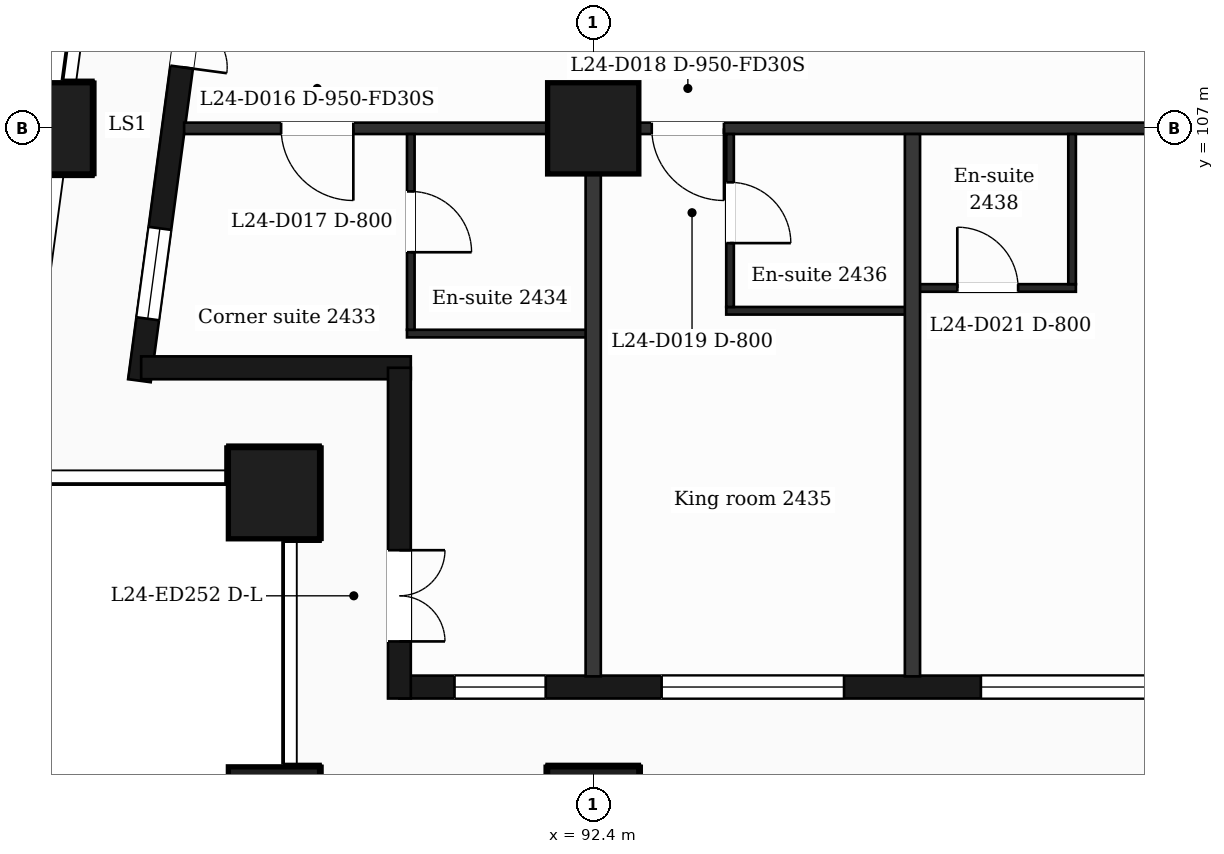
"""IFC4 building model, lengths in metres.
Left out: names, types, materials, properties, quantities, classifications, styles, units other than length and angle.
Written with IfcOpenShell. Run it as: python <this file> out.ifc"""

import sys

from ifc_helpers import new_model, si_unit, direction, frame, frame_2d, origin, origin_2d, place, context, subcontext, project, spatial, rectangle, extrude, element, fill, save


model = new_model("IFC4")
c1 = context("Model", 3, precision=1e-05, world=origin(), true_north=direction((0.0, 1.0)))
c2 = subcontext(c1, "Body", "Model", "MODEL_VIEW")
j1 = project(units=[si_unit("LENGTHUNIT", "METRE"), si_unit("PLANEANGLEUNIT", "RADIAN")], contexts=[c1])
p1 = place(None, origin())
s1 = spatial("IfcSite", under=j1, at=p1, CompositionType="ELEMENT")
p2 = place(p1, origin())
s2 = spatial("IfcBuilding", under=s1, at=p2, CompositionType="ELEMENT")
p3 = place(p2, frame((0.0, 0.0, 105.8)))
s3 = spatial("IfcBuildingStorey", under=s2, at=p3, CompositionType="ELEMENT", Elevation=105.8)
for number, where, z_axis, x_axis in (
    (1, (92.4, 98.0, 0.0), (0.0, 0.0, 1.0), (1.0, 0.0, 0.0)),
    (2, (88.2, 98.0, 0.0), (0.0, 0.0, 1.0), (1.0, 0.0, 0.0)),
    (3, (88.2, 102.2, 0.0), (0.0, 0.0, 1.0), (1.0, 0.0, 0.0)),
    (4, (92.4, 107.0, 0.0), (0.0, 0.0, 1.0), (1.0, 0.0, 0.0)),
    (5, (85.211, 107.0, 0.0), (0.0, 0.0, 1.0), (1.0, 0.0, 0.0)),
):
    element("IfcColumn", number, at=place(p3, frame(where, z_axis=z_axis, x_axis=x_axis)), inside=s3, PredefinedType="COLUMN", context=c2, shape_type="SweptSolid", body=[
        extrude(rectangle(XDim=1.2, YDim=1.2, at=origin_2d()), origin(), (0.0, 0.0, 1.0), 3.7),
    ])
p4 = place(p3, frame((89.85, 99.65, 0.0), z_axis=(0.0, 0.0, 1.0), x_axis=(1.0, 0.0, 0.0)))
e6 = element("IfcWall", 6, at=p4, inside=s3, PredefinedType="SOLIDWALL", context=c2, shape_type="SweptSolid", body=[
    extrude(rectangle(XDim=47.25, YDim=0.3, at=frame_2d((23.625, 0.0))), origin(), (0.0, 0.0, 1.0), 3.38),
])
p5 = place(p4, frame((0.725, 0.0, 0.9)))
e7 = element("IfcOpeningElement", 7, at=p5, cuts=e6, PredefinedType="OPENING", context=c2, shape_type="SweptSolid", body=[
    extrude(rectangle(XDim=1.2, YDim=2.1, at=frame_2d((0.6, 1.05))), frame((0.0, 0.16, 0.0), z_axis=(0.0, -1.0, 0.0), x_axis=(1.0, 0.0, 0.0)), (0.0, 0.0, 1.0), 0.32),
])
p6 = place(p4, frame((3.45, 0.0, 0.9)))
e8 = element("IfcOpeningElement", 8, at=p6, cuts=e6, PredefinedType="OPENING", context=c2, shape_type="SweptSolid", body=[
    extrude(rectangle(XDim=2.4, YDim=2.1, at=frame_2d((1.2, 1.05))), frame((0.0, 0.16, 0.0), z_axis=(0.0, -1.0, 0.0), x_axis=(1.0, 0.0, 0.0)), (0.0, 0.0, 1.0), 0.32),
])
p7 = place(p4, frame((7.65, 0.0, 0.9)))
e9 = element("IfcOpeningElement", 9, at=p7, cuts=e6, PredefinedType="OPENING", context=c2, shape_type="SweptSolid", body=[
    extrude(rectangle(XDim=2.4, YDim=2.1, at=frame_2d((1.2, 1.05))), frame((0.0, 0.16, 0.0), z_axis=(0.0, -1.0, 0.0), x_axis=(1.0, 0.0, 0.0)), (0.0, 0.0, 1.0), 0.32),
])
p8 = place(p4, frame((12.45, 0.0, 0.9)))
e10 = element("IfcOpeningElement", 10, at=p8, cuts=e6, PredefinedType="OPENING", context=c2, shape_type="SweptSolid", body=[
    extrude(rectangle(XDim=1.2, YDim=2.1, at=frame_2d((0.6, 1.05))), frame((0.0, 0.16, 0.0), z_axis=(0.0, -1.0, 0.0), x_axis=(1.0, 0.0, 0.0)), (0.0, 0.0, 1.0), 0.32),
])
p9 = place(p4, frame((16.65, 0.0, 0.9)))
e11 = element("IfcOpeningElement", 11, at=p9, cuts=e6, PredefinedType="OPENING", context=c2, shape_type="SweptSolid", body=[
    extrude(rectangle(XDim=1.2, YDim=2.1, at=frame_2d((0.6, 1.05))), frame((0.0, 0.16, 0.0), z_axis=(0.0, -1.0, 0.0), x_axis=(1.0, 0.0, 0.0)), (0.0, 0.0, 1.0), 0.32),
])
p10 = place(p4, frame((19.95, 0.0, 0.0)))
e12 = element("IfcOpeningElement", 12, at=p10, cuts=e6, PredefinedType="OPENING", context=c2, shape_type="SweptSolid", body=[
    extrude(rectangle(XDim=1.2, YDim=2.4, at=frame_2d((0.6, 1.2))), frame((0.0, 0.16, 0.0), z_axis=(0.0, -1.0, 0.0), x_axis=(1.0, 0.0, 0.0)), (0.0, 0.0, 1.0), 0.32),
])
p11 = place(p4, frame((21.75, 0.0, 0.9)))
e13 = element("IfcOpeningElement", 13, at=p11, cuts=e6, PredefinedType="OPENING", context=c2, shape_type="SweptSolid", body=[
    extrude(rectangle(XDim=1.2, YDim=2.1, at=frame_2d((0.6, 1.05))), frame((0.0, 0.16, 0.0), z_axis=(0.0, -1.0, 0.0), x_axis=(1.0, 0.0, 0.0)), (0.0, 0.0, 1.0), 0.32),
])
p12 = place(p4, frame((24.45, 0.0, 0.9)))
e14 = element("IfcOpeningElement", 14, at=p12, cuts=e6, PredefinedType="OPENING", context=c2, shape_type="SweptSolid", body=[
    extrude(rectangle(XDim=2.4, YDim=2.1, at=frame_2d((1.2, 1.05))), frame((0.0, 0.16, 0.0), z_axis=(0.0, -1.0, 0.0), x_axis=(1.0, 0.0, 0.0)), (0.0, 0.0, 1.0), 0.32),
])
p13 = place(p4, frame((28.35, 0.0, 0.0)))
e15 = element("IfcOpeningElement", 15, at=p13, cuts=e6, PredefinedType="OPENING", context=c2, shape_type="SweptSolid", body=[
    extrude(rectangle(XDim=1.2, YDim=2.4, at=frame_2d((0.6, 1.2))), frame((0.0, 0.16, 0.0), z_axis=(0.0, -1.0, 0.0), x_axis=(1.0, 0.0, 0.0)), (0.0, 0.0, 1.0), 0.32),
])
p14 = place(p4, frame((30.15, 0.0, 0.9)))
e16 = element("IfcOpeningElement", 16, at=p14, cuts=e6, PredefinedType="OPENING", context=c2, shape_type="SweptSolid", body=[
    extrude(rectangle(XDim=1.2, YDim=2.1, at=frame_2d((0.6, 1.05))), frame((0.0, 0.16, 0.0), z_axis=(0.0, -1.0, 0.0), x_axis=(1.0, 0.0, 0.0)), (0.0, 0.0, 1.0), 0.32),
])
p15 = place(p4, frame((32.85, 0.0, 0.9)))
e17 = element("IfcOpeningElement", 17, at=p15, cuts=e6, PredefinedType="OPENING", context=c2, shape_type="SweptSolid", body=[
    extrude(rectangle(XDim=2.4, YDim=2.1, at=frame_2d((1.2, 1.05))), frame((0.0, 0.16, 0.0), z_axis=(0.0, -1.0, 0.0), x_axis=(1.0, 0.0, 0.0)), (0.0, 0.0, 1.0), 0.32),
])
p16 = place(p4, frame((37.05, 0.0, 0.9)))
e18 = element("IfcOpeningElement", 18, at=p16, cuts=e6, PredefinedType="OPENING", context=c2, shape_type="SweptSolid", body=[
    extrude(rectangle(XDim=2.4, YDim=2.1, at=frame_2d((1.2, 1.05))), frame((0.0, 0.16, 0.0), z_axis=(0.0, -1.0, 0.0), x_axis=(1.0, 0.0, 0.0)), (0.0, 0.0, 1.0), 0.32),
])
p17 = place(p4, frame((41.85, 0.0, 0.9)))
e19 = element("IfcOpeningElement", 19, at=p17, cuts=e6, PredefinedType="OPENING", context=c2, shape_type="SweptSolid", body=[
    extrude(rectangle(XDim=1.2, YDim=2.1, at=frame_2d((0.6, 1.05))), frame((0.0, 0.16, 0.0), z_axis=(0.0, -1.0, 0.0), x_axis=(1.0, 0.0, 0.0)), (0.0, 0.0, 1.0), 0.32),
])
p18 = place(p4, frame((45.25, 0.0, 0.9)))
e20 = element("IfcOpeningElement", 20, at=p18, cuts=e6, PredefinedType="OPENING", context=c2, shape_type="SweptSolid", body=[
    extrude(rectangle(XDim=1.2, YDim=2.1, at=frame_2d((0.6, 1.05))), frame((0.0, 0.16, 0.0), z_axis=(0.0, -1.0, 0.0), x_axis=(1.0, 0.0, 0.0)), (0.0, 0.0, 1.0), 0.32),
])
p19 = place(p3, frame((87.334, 110.4, 0.0), z_axis=(0.0, 0.0, 1.0), x_axis=(-0.133437175554, -0.991057273915, 0.0)))
e21 = element("IfcWall", 21, at=p19, inside=s3, PredefinedType="SOLIDWALL", context=c2, shape_type="SweptSolid", body=[
    extrude(rectangle(XDim=6.781, YDim=0.3, at=frame_2d((3.39, 0.0))), origin(), (0.0, 0.0, 1.0), 3.38),
])
p20 = place(p19, frame((1.418, 0.0, 0.0)))
e22 = element("IfcOpeningElement", 22, at=p20, cuts=e21, PredefinedType="OPENING", context=c2, shape_type="SweptSolid", body=[
    extrude(rectangle(XDim=1.2, YDim=2.4, at=frame_2d((0.6, 1.2))), frame((0.0, 0.16, 0.0), z_axis=(0.0, -1.0, 0.0), x_axis=(1.0, 0.0, 0.0)), (0.0, 0.0, 1.0), 0.32),
])
p21 = place(p19, frame((4.758, 0.0, 0.9)))
e23 = element("IfcOpeningElement", 23, at=p21, cuts=e21, PredefinedType="OPENING", context=c2, shape_type="SweptSolid", body=[
    extrude(rectangle(XDim=1.2, YDim=2.1, at=frame_2d((0.6, 1.05))), frame((0.0, 0.16, 0.0), z_axis=(0.0, -1.0, 0.0), x_axis=(1.0, 0.0, 0.0)), (0.0, 0.0, 1.0), 0.32),
])
p22 = place(p3, frame((86.452, 103.85, 0.0), z_axis=(0.0, 0.0, 1.0), x_axis=(1.0, 0.0, 0.0)))
e24 = element("IfcWall", 24, at=p22, inside=s3, PredefinedType="SOLIDWALL", context=c2, shape_type="SweptSolid", body=[
    extrude(rectangle(XDim=3.548, YDim=0.3, at=frame_2d((1.774, 0.0))), origin(), (0.0, 0.0, 1.0), 3.38),
])
p23 = place(p3, frame((89.85, 103.85, 0.0), z_axis=(0.0, 0.0, 1.0), x_axis=(0.0, -1.0, 0.0)))
e25 = element("IfcWall", 25, at=p23, inside=s3, PredefinedType="SOLIDWALL", context=c2, shape_type="SweptSolid", body=[
    extrude(rectangle(XDim=4.35, YDim=0.3, at=frame_2d((2.175, 0.0))), origin(), (0.0, 0.0, 1.0), 3.38),
])
p24 = place(p23, frame((2.4, 0.0, 0.0)))
e26 = element("IfcOpeningElement", 26, at=p24, cuts=e25, PredefinedType="OPENING", context=c2, shape_type="SweptSolid", body=[
    extrude(rectangle(XDim=1.2, YDim=2.4, at=frame_2d((0.6, 1.2))), frame((0.0, 0.16, 0.0), z_axis=(0.0, -1.0, 0.0), x_axis=(1.0, 0.0, 0.0)), (0.0, 0.0, 1.0), 0.32),
])
p25 = place(p3, frame((89.95, 104.3, 0.0), z_axis=(0.0, 0.0, 1.0), x_axis=(1.0, 0.0, 0.0)))
e27 = element("IfcWall", 27, at=p25, inside=s3, PredefinedType="PARTITIONING", context=c2, shape_type="SweptSolid", body=[
    extrude(rectangle(XDim=2.45, YDim=0.1, at=frame_2d((1.225, 0.0))), origin(), (0.0, 0.0, 1.0), 3.38),
])
p26 = place(p3, frame((94.15, 104.6, 0.0), z_axis=(0.0, 0.0, 1.0), x_axis=(1.0, 0.0, 0.0)))
e28 = element("IfcWall", 28, at=p26, inside=s3, PredefinedType="PARTITIONING", context=c2, shape_type="SweptSolid", body=[
    extrude(rectangle(XDim=2.45, YDim=0.1, at=frame_2d((1.225, 0.0))), origin(), (0.0, 0.0, 1.0), 3.38),
])
p27 = place(p3, frame((96.6, 104.9, 0.0), z_axis=(0.0, 0.0, 1.0), x_axis=(1.0, 0.0, 0.0)))
e29 = element("IfcWall", 29, at=p27, inside=s3, PredefinedType="PARTITIONING", context=c2, shape_type="SweptSolid", body=[
    extrude(rectangle(XDim=2.15, YDim=0.1, at=frame_2d((1.075, 0.0))), origin(), (0.0, 0.0, 1.0), 3.38),
])
p28 = place(p27, frame((0.59, 0.0, 0.0)))
e30 = element("IfcOpeningElement", 30, at=p28, cuts=e29, PredefinedType="OPENING", context=c2, shape_type="SweptSolid", body=[
    extrude(rectangle(XDim=0.8, YDim=2.1, at=frame_2d((0.4, 1.05))), frame((0.0, 0.06, 0.0), z_axis=(0.0, -1.0, 0.0), x_axis=(1.0, 0.0, 0.0)), (0.0, 0.0, 1.0), 0.12),
])
p29 = place(p3, frame((87.018, 107.0, 0.0), z_axis=(0.0, 0.0, 1.0), x_axis=(1.0, 0.0, 0.0)))
e31 = element("IfcWall", 31, at=p29, inside=s3, PredefinedType="PARTITIONING", context=c2, shape_type="SweptSolid", body=[
    extrude(rectangle(XDim=52.765, YDim=0.15, at=frame_2d((26.382, 0.0))), origin(), (0.0, 0.0, 1.0), 3.38),
])
p30 = place(p29, frame((1.276, 0.0, 0.0)))
e32 = element("IfcOpeningElement", 32, at=p30, cuts=e31, PredefinedType="OPENING", context=c2, shape_type="SweptSolid", body=[
    extrude(rectangle(XDim=0.95, YDim=2.1, at=frame_2d((0.475, 1.05))), frame((0.0, 0.085, 0.0), z_axis=(0.0, -1.0, 0.0), x_axis=(1.0, 0.0, 0.0)), (0.0, 0.0, 1.0), 0.17),
])
p31 = place(p29, frame((6.152, 0.0, 0.0)))
e33 = element("IfcOpeningElement", 33, at=p31, cuts=e31, PredefinedType="OPENING", context=c2, shape_type="SweptSolid", body=[
    extrude(rectangle(XDim=0.95, YDim=2.1, at=frame_2d((0.475, 1.05))), frame((0.0, 0.085, 0.0), z_axis=(0.0, -1.0, 0.0), x_axis=(1.0, 0.0, 0.0)), (0.0, 0.0, 1.0), 0.17),
])
p32 = place(p29, frame((14.59, 0.0, 0.0)))
e34 = element("IfcOpeningElement", 34, at=p32, cuts=e31, PredefinedType="OPENING", context=c2, shape_type="SweptSolid", body=[
    extrude(rectangle(XDim=0.95, YDim=2.1, at=frame_2d((0.475, 1.05))), frame((0.0, 0.085, 0.0), z_axis=(0.0, -1.0, 0.0), x_axis=(1.0, 0.0, 0.0)), (0.0, 0.0, 1.0), 0.17),
])
p33 = place(p29, frame((18.257, 0.0, 0.0)))
e35 = element("IfcOpeningElement", 35, at=p33, cuts=e31, PredefinedType="OPENING", context=c2, shape_type="SweptSolid", body=[
    extrude(rectangle(XDim=0.95, YDim=2.1, at=frame_2d((0.475, 1.05))), frame((0.0, 0.085, 0.0), z_axis=(0.0, -1.0, 0.0), x_axis=(1.0, 0.0, 0.0)), (0.0, 0.0, 1.0), 0.17),
])
p34 = place(p29, frame((26.672, 0.0, 0.0)))
e36 = element("IfcOpeningElement", 36, at=p34, cuts=e31, PredefinedType="OPENING", context=c2, shape_type="SweptSolid", body=[
    extrude(rectangle(XDim=0.95, YDim=2.1, at=frame_2d((0.475, 1.05))), frame((0.0, 0.085, 0.0), z_axis=(0.0, -1.0, 0.0), x_axis=(1.0, 0.0, 0.0)), (0.0, 0.0, 1.0), 0.17),
])
p35 = place(p29, frame((31.392, 0.0, 0.0)))
e37 = element("IfcOpeningElement", 37, at=p35, cuts=e31, PredefinedType="OPENING", context=c2, shape_type="SweptSolid", body=[
    extrude(rectangle(XDim=0.95, YDim=2.1, at=frame_2d((0.475, 1.05))), frame((0.0, 0.085, 0.0), z_axis=(0.0, -1.0, 0.0), x_axis=(1.0, 0.0, 0.0)), (0.0, 0.0, 1.0), 0.17),
])
p36 = place(p29, frame((37.182, 0.0, 0.0)))
e38 = element("IfcOpeningElement", 38, at=p36, cuts=e31, PredefinedType="OPENING", context=c2, shape_type="SweptSolid", body=[
    extrude(rectangle(XDim=0.95, YDim=2.1, at=frame_2d((0.475, 1.05))), frame((0.0, 0.085, 0.0), z_axis=(0.0, -1.0, 0.0), x_axis=(1.0, 0.0, 0.0)), (0.0, 0.0, 1.0), 0.17),
])
p37 = place(p29, frame((41.762, 0.0, 0.0)))
e39 = element("IfcOpeningElement", 39, at=p37, cuts=e31, PredefinedType="OPENING", context=c2, shape_type="SweptSolid", body=[
    extrude(rectangle(XDim=0.95, YDim=2.1, at=frame_2d((0.475, 1.05))), frame((0.0, 0.085, 0.0), z_axis=(0.0, -1.0, 0.0), x_axis=(1.0, 0.0, 0.0)), (0.0, 0.0, 1.0), 0.17),
])
p38 = place(p29, frame((49.285, 0.0, 0.0)))
e40 = element("IfcOpeningElement", 40, at=p38, cuts=e31, PredefinedType="OPENING", context=c2, shape_type="SweptSolid", body=[
    extrude(rectangle(XDim=0.95, YDim=2.1, at=frame_2d((0.475, 1.05))), frame((0.0, 0.085, 0.0), z_axis=(0.0, -1.0, 0.0), x_axis=(1.0, 0.0, 0.0)), (0.0, 0.0, 1.0), 0.17),
])
p39 = place(p3, frame((90.0, 104.35, 0.0), z_axis=(0.0, 0.0, 1.0), x_axis=(0.0, 1.0, 0.0)))
e41 = element("IfcWall", 41, at=p39, inside=s3, PredefinedType="PARTITIONING", context=c2, shape_type="SweptSolid", body=[
    extrude(rectangle(XDim=2.575, YDim=0.1, at=frame_2d((1.288, 0.0))), origin(), (0.0, 0.0, 1.0), 3.38),
])
p40 = place(p39, frame((1.02, 0.0, 0.0)))
e42 = element("IfcOpeningElement", 42, at=p40, cuts=e41, PredefinedType="OPENING", context=c2, shape_type="SweptSolid", body=[
    extrude(rectangle(XDim=0.8, YDim=2.1, at=frame_2d((0.4, 1.05))), frame((0.0, 0.06, 0.0), z_axis=(0.0, -1.0, 0.0), x_axis=(1.0, 0.0, 0.0)), (0.0, 0.0, 1.0), 0.12),
])
p41 = place(p3, frame((92.4, 99.79, 0.0), z_axis=(0.0, 0.0, 1.0), x_axis=(0.0, 1.0, 0.0)))
e43 = element("IfcWall", 43, at=p41, inside=s3, PredefinedType="PARTITIONING", context=c2, shape_type="SweptSolid", body=[
    extrude(rectangle(XDim=7.135, YDim=0.2, at=frame_2d((3.567, 0.0))), origin(), (0.0, 0.0, 1.0), 3.38),
])
p42 = place(p3, frame((94.2, 104.65, 0.0), z_axis=(0.0, 0.0, 1.0), x_axis=(0.0, 1.0, 0.0)))
e44 = element("IfcWall", 44, at=p42, inside=s3, PredefinedType="PARTITIONING", context=c2, shape_type="SweptSolid", body=[
    extrude(rectangle(XDim=2.275, YDim=0.1, at=frame_2d((1.138, 0.0))), origin(), (0.0, 0.0, 1.0), 3.38),
])
p43 = place(p42, frame((0.84, 0.0, 0.0)))
e45 = element("IfcOpeningElement", 45, at=p43, cuts=e44, PredefinedType="OPENING", context=c2, shape_type="SweptSolid", body=[
    extrude(rectangle(XDim=0.8, YDim=2.1, at=frame_2d((0.4, 1.05))), frame((0.0, 0.06, 0.0), z_axis=(0.0, -1.0, 0.0), x_axis=(1.0, 0.0, 0.0)), (0.0, 0.0, 1.0), 0.12),
])
p44 = place(p3, frame((96.6, 99.79, 0.0), z_axis=(0.0, 0.0, 1.0), x_axis=(0.0, 1.0, 0.0)))
e46 = element("IfcWall", 46, at=p44, inside=s3, PredefinedType="PARTITIONING", context=c2, shape_type="SweptSolid", body=[
    extrude(rectangle(XDim=7.135, YDim=0.2, at=frame_2d((3.567, 0.0))), origin(), (0.0, 0.0, 1.0), 3.38),
])
p45 = place(p3, frame((98.7, 104.95, 0.0), z_axis=(0.0, 0.0, 1.0), x_axis=(0.0, 1.0, 0.0)))
e47 = element("IfcWall", 47, at=p45, inside=s3, PredefinedType="PARTITIONING", context=c2, shape_type="SweptSolid", body=[
    extrude(rectangle(XDim=1.975, YDim=0.1, at=frame_2d((0.988, 0.0))), origin(), (0.0, 0.0, 1.0), 3.38),
])
p46 = place(p5, origin())
e48 = element("IfcWindow", 48, at=p46, inside=s3, PartitioningType="SINGLE_PANEL", PredefinedType="WINDOW", context=c2, shape_type="SweptSolid", body=[
    extrude(rectangle(XDim=1.2, YDim=2.1, at=frame_2d((0.6, 1.05))), frame((0.0, 0.03, 0.0), z_axis=(0.0, -1.0, 0.0), x_axis=(1.0, 0.0, 0.0)), (0.0, 0.0, 1.0), 0.06),
])
fill(e7, e48)
p47 = place(p6, origin())
e49 = element("IfcWindow", 49, at=p47, inside=s3, PartitioningType="SINGLE_PANEL", PredefinedType="WINDOW", context=c2, shape_type="SweptSolid", body=[
    extrude(rectangle(XDim=2.4, YDim=2.1, at=frame_2d((1.2, 1.05))), frame((0.0, 0.03, 0.0), z_axis=(0.0, -1.0, 0.0), x_axis=(1.0, 0.0, 0.0)), (0.0, 0.0, 1.0), 0.06),
])
fill(e8, e49)
p48 = place(p7, origin())
e50 = element("IfcWindow", 50, at=p48, inside=s3, PartitioningType="SINGLE_PANEL", PredefinedType="WINDOW", context=c2, shape_type="SweptSolid", body=[
    extrude(rectangle(XDim=2.4, YDim=2.1, at=frame_2d((1.2, 1.05))), frame((0.0, 0.03, 0.0), z_axis=(0.0, -1.0, 0.0), x_axis=(1.0, 0.0, 0.0)), (0.0, 0.0, 1.0), 0.06),
])
fill(e9, e50)
p49 = place(p20, origin())
e51 = element("IfcDoor", 51, at=p49, inside=s3, OperationType="DOUBLE_DOOR_SINGLE_SWING", PredefinedType="DOOR", context=c2, shape_type="SweptSolid", body=[
    extrude(rectangle(XDim=1.2, YDim=2.4, at=frame_2d((0.6, 1.2))), frame((0.0, 0.025, 0.0), z_axis=(0.0, -1.0, 0.0), x_axis=(1.0, 0.0, 0.0)), (0.0, 0.0, 1.0), 0.05),
])
fill(e22, e51)
p50 = place(p21, origin())
e52 = element("IfcWindow", 52, at=p50, inside=s3, PartitioningType="SINGLE_PANEL", PredefinedType="WINDOW", context=c2, shape_type="SweptSolid", body=[
    extrude(rectangle(XDim=1.2, YDim=2.1, at=frame_2d((0.6, 1.05))), frame((0.0, 0.03, 0.0), z_axis=(0.0, -1.0, 0.0), x_axis=(1.0, 0.0, 0.0)), (0.0, 0.0, 1.0), 0.06),
])
fill(e23, e52)
p51 = place(p24, origin())
e53 = element("IfcDoor", 53, at=p51, inside=s3, OperationType="DOUBLE_DOOR_SINGLE_SWING", PredefinedType="DOOR", context=c2, shape_type="SweptSolid", body=[
    extrude(rectangle(XDim=1.2, YDim=2.4, at=frame_2d((0.6, 1.2))), frame((0.0, 0.025, 0.0), z_axis=(0.0, -1.0, 0.0), x_axis=(1.0, 0.0, 0.0)), (0.0, 0.0, 1.0), 0.05),
])
fill(e26, e53)
p52 = place(p30, origin())
e54 = element("IfcDoor", 54, at=p52, inside=s3, OperationType="SINGLE_SWING_RIGHT", PredefinedType="DOOR", context=c2, shape_type="SweptSolid", body=[
    extrude(rectangle(XDim=0.95, YDim=2.1, at=frame_2d((0.475, 1.05))), frame((0.0, 0.025, 0.0), z_axis=(0.0, -1.0, 0.0), x_axis=(1.0, 0.0, 0.0)), (0.0, 0.0, 1.0), 0.05),
])
fill(e32, e54)
p53 = place(p40, origin())
e55 = element("IfcDoor", 55, at=p53, inside=s3, OperationType="SINGLE_SWING_LEFT", PredefinedType="DOOR", context=c2, shape_type="SweptSolid", body=[
    extrude(rectangle(XDim=0.8, YDim=2.1, at=frame_2d((0.4, 1.05))), frame((0.0, 0.025, 0.0), z_axis=(0.0, -1.0, 0.0), x_axis=(1.0, 0.0, 0.0)), (0.0, 0.0, 1.0), 0.05),
])
fill(e42, e55)
p54 = place(p31, origin())
e56 = element("IfcDoor", 56, at=p54, inside=s3, OperationType="SINGLE_SWING_RIGHT", PredefinedType="DOOR", context=c2, shape_type="SweptSolid", body=[
    extrude(rectangle(XDim=0.95, YDim=2.1, at=frame_2d((0.475, 1.05))), frame((0.0, 0.025, 0.0), z_axis=(0.0, -1.0, 0.0), x_axis=(1.0, 0.0, 0.0)), (0.0, 0.0, 1.0), 0.05),
])
fill(e33, e56)
p55 = place(p43, origin())
e57 = element("IfcDoor", 57, at=p55, inside=s3, OperationType="SINGLE_SWING_LEFT", PredefinedType="DOOR", context=c2, shape_type="SweptSolid", body=[
    extrude(rectangle(XDim=0.8, YDim=2.1, at=frame_2d((0.4, 1.05))), frame((0.0, 0.025, 0.0), z_axis=(0.0, -1.0, 0.0), x_axis=(1.0, 0.0, 0.0)), (0.0, 0.0, 1.0), 0.05),
])
fill(e45, e57)
p56 = place(p28, origin())
e58 = element("IfcDoor", 58, at=p56, inside=s3, OperationType="SINGLE_SWING_LEFT", PredefinedType="DOOR", context=c2, shape_type="SweptSolid", body=[
    extrude(rectangle(XDim=0.8, YDim=2.1, at=frame_2d((0.4, 1.05))), frame((0.0, 0.025, 0.0), z_axis=(0.0, -1.0, 0.0), x_axis=(1.0, 0.0, 0.0)), (0.0, 0.0, 1.0), 0.05),
])
fill(e30, e58)
save(model, sys.argv[1])
